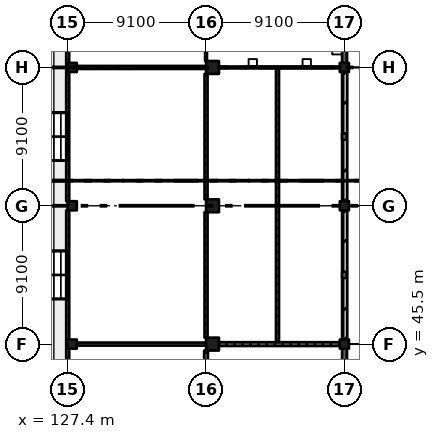
"""IFC4 building model, lengths in metres.
Left out: names, types, materials, properties, quantities, classifications, styles, units other than length and angle.
Written with IfcOpenShell. Run it as: python <this file> out.ifc"""

import sys

from ifc_helpers import new_model, si_unit, direction, frame, frame_2d, origin, origin_2d, place, context, subcontext, project, spatial, rectangle, extrude, element, fill, save


model = new_model("IFC4")
c1 = context("Model", 3, precision=1e-05, world=origin(), true_north=direction((0.0, 1.0)))
c2 = subcontext(c1, "Body", "Model", "MODEL_VIEW")
j1 = project(units=[si_unit("LENGTHUNIT", "METRE"), si_unit("PLANEANGLEUNIT", "RADIAN")], contexts=[c1])
p1 = place(None, origin())
s1 = spatial("IfcSite", under=j1, at=p1, CompositionType="ELEMENT")
p2 = place(p1, origin())
s2 = spatial("IfcBuilding", under=s1, at=p2, CompositionType="ELEMENT")
p3 = place(p2, origin())
s3 = spatial("IfcBuildingStorey", under=s2, at=p3, CompositionType="ELEMENT", Elevation=0.0)
for number, where, z_axis, x_axis in (
    (1, (127.7, 45.5, -0.4), (0.0, 0.0, 1.0), (1.0, 0.0, 0.0)),
    (2, (127.7, 54.6, -0.4), (0.0, 0.0, 1.0), (1.0, 0.0, 0.0)),
    (3, (127.7, 63.7, -0.4), (0.0, 0.0, 1.0), (1.0, 0.0, 0.0)),
):
    element("IfcColumn", number, at=place(p3, frame(where, z_axis=z_axis, x_axis=x_axis)), inside=s3, PredefinedType="COLUMN", context=c2, shape_type="SweptSolid", body=[
        extrude(rectangle(XDim=0.6, YDim=0.6, at=origin_2d()), origin(), (0.0, 0.0, 1.0), 6.77),
    ])
for number, where, z_axis, x_axis in (
    (4, (136.925, 45.5, -0.4), (0.0, 0.0, 1.0), (1.0, 0.0, 0.0)),
    (5, (136.925, 54.6, -0.4), (0.0, 0.0, 1.0), (1.0, 0.0, 0.0)),
    (6, (136.925, 63.7, -0.4), (0.0, 0.0, 1.0), (1.0, 0.0, 0.0)),
):
    element("IfcColumn", number, at=place(p3, frame(where, z_axis=z_axis, x_axis=x_axis)), inside=s3, PredefinedType="COLUMN", context=c2, shape_type="SweptSolid", body=[
        extrude(rectangle(XDim=0.85, YDim=0.85, at=origin_2d()), origin(), (0.0, 0.0, 1.0), 6.77),
    ])
for number, where, z_axis, x_axis in (
    (7, (145.6, 45.5, -0.4), (0.0, 0.0, 1.0), (1.0, 0.0, 0.0)),
    (8, (145.6, 54.6, -0.4), (0.0, 0.0, 1.0), (1.0, 0.0, 0.0)),
    (9, (145.6, 63.7, -0.4), (0.0, 0.0, 1.0), (1.0, 0.0, 0.0)),
):
    element("IfcColumn", number, at=place(p3, frame(where, z_axis=z_axis, x_axis=x_axis)), inside=s3, PredefinedType="COLUMN", context=c2, shape_type="SweptSolid", body=[
        extrude(rectangle(XDim=0.6, YDim=0.6, at=origin_2d()), origin(), (0.0, 0.0, 1.0), 6.77),
    ])
p4 = place(p3, frame((145.6, 36.725, 0.0), z_axis=(0.0, 0.0, 1.0), x_axis=(0.0, 1.0, 0.0)))
e10 = element("IfcWall", 10, at=p4, inside=s3, PredefinedType="SOLIDWALL", context=c2, shape_type="SweptSolid", body=[
    extrude(rectangle(XDim=8.475, YDim=0.3, at=frame_2d((4.237, 0.0))), origin(), (0.0, 0.0, 1.0), 5.27),
])
p5 = place(p3, frame((145.6, 45.8, 0.0), z_axis=(0.0, 0.0, 1.0), x_axis=(0.0, 1.0, 0.0)))
e11 = element("IfcWall", 11, at=p5, inside=s3, PredefinedType="SOLIDWALL", context=c2, shape_type="SweptSolid", body=[
    extrude(rectangle(XDim=8.5, YDim=0.3, at=frame_2d((4.25, 0.0))), origin(), (0.0, 0.0, 1.0), 3.75),
])
p6 = place(p5, frame((0.435, 0.0, 0.0)))
e12 = element("IfcOpeningElement", 12, at=p6, cuts=e11, PredefinedType="OPENING", context=c2, shape_type="SweptSolid", body=[
    extrude(rectangle(XDim=3.6, YDim=2.7, at=frame_2d((1.8, 1.35))), frame((0.0, 0.16, 0.0), z_axis=(0.0, -1.0, 0.0), x_axis=(1.0, 0.0, 0.0)), (0.0, 0.0, 1.0), 0.32),
])
p7 = place(p5, frame((4.465, 0.0, 0.0)))
e13 = element("IfcOpeningElement", 13, at=p7, cuts=e11, PredefinedType="OPENING", context=c2, shape_type="SweptSolid", body=[
    extrude(rectangle(XDim=3.6, YDim=2.7, at=frame_2d((1.8, 1.35))), frame((0.0, 0.16, 0.0), z_axis=(0.0, -1.0, 0.0), x_axis=(1.0, 0.0, 0.0)), (0.0, 0.0, 1.0), 0.32),
])
p8 = place(p3, frame((145.6, 49.835, 3.75), z_axis=(0.0, 0.0, 1.0), x_axis=(0.0, 1.0, 0.0)))
e14 = element("IfcWall", 14, at=p8, inside=s3, PredefinedType="SOLIDWALL", context=c2, shape_type="SweptSolid", body=[
    extrude(rectangle(XDim=0.43, YDim=0.3, at=frame_2d((0.215, 0.0))), origin(), (0.0, 0.0, 1.0), 1.52),
])
p9 = place(p3, frame((145.6, 54.9, 0.0), z_axis=(0.0, 0.0, 1.0), x_axis=(0.0, 1.0, 0.0)))
e15 = element("IfcWall", 15, at=p9, inside=s3, PredefinedType="SOLIDWALL", context=c2, shape_type="SweptSolid", body=[
    extrude(rectangle(XDim=8.5, YDim=0.3, at=frame_2d((4.25, 0.0))), origin(), (0.0, 0.0, 1.0), 3.75),
])
p10 = place(p9, frame((0.435, 0.0, 0.0)))
e16 = element("IfcOpeningElement", 16, at=p10, cuts=e15, PredefinedType="OPENING", context=c2, shape_type="SweptSolid", body=[
    extrude(rectangle(XDim=3.6, YDim=2.7, at=frame_2d((1.8, 1.35))), frame((0.0, 0.16, 0.0), z_axis=(0.0, -1.0, 0.0), x_axis=(1.0, 0.0, 0.0)), (0.0, 0.0, 1.0), 0.32),
])
p11 = place(p9, frame((4.465, 0.0, 0.0)))
e17 = element("IfcOpeningElement", 17, at=p11, cuts=e15, PredefinedType="OPENING", context=c2, shape_type="SweptSolid", body=[
    extrude(rectangle(XDim=3.6, YDim=2.7, at=frame_2d((1.8, 1.35))), frame((0.0, 0.16, 0.0), z_axis=(0.0, -1.0, 0.0), x_axis=(1.0, 0.0, 0.0)), (0.0, 0.0, 1.0), 0.32),
])
p12 = place(p3, frame((145.6, 58.935, 3.75), z_axis=(0.0, 0.0, 1.0), x_axis=(0.0, 1.0, 0.0)))
e18 = element("IfcWall", 18, at=p12, inside=s3, PredefinedType="SOLIDWALL", context=c2, shape_type="SweptSolid", body=[
    extrude(rectangle(XDim=0.43, YDim=0.3, at=frame_2d((0.215, 0.0))), origin(), (0.0, 0.0, 1.0), 1.52),
])
p13 = place(p3, frame((145.6, 64.0, 0.0), z_axis=(0.0, 0.0, 1.0), x_axis=(0.0, 1.0, 0.0)))
e19 = element("IfcWall", 19, at=p13, inside=s3, PredefinedType="SOLIDWALL", context=c2, shape_type="SweptSolid", body=[
    extrude(rectangle(XDim=8.475, YDim=0.3, at=frame_2d((4.238, 0.0))), origin(), (0.0, 0.0, 1.0), 5.27),
])
p14 = place(p3, frame((127.4, 41.05, 0.0), z_axis=(0.0, 0.0, 1.0), x_axis=(0.0, 1.0, 0.0)))
e20 = element("IfcWall", 20, at=p14, inside=s3, PredefinedType="PARTITIONING", context=c2, shape_type="SweptSolid", body=[
    extrude(rectangle(XDim=4.45, YDim=0.2, at=frame_2d((2.225, 0.0))), origin(), (0.0, 0.0, 1.0), 5.02),
])
for number, where, z_axis, x_axis in (
    (21, (127.4, 45.5, 0.0), (0.0, 0.0, 1.0), (0.0, 1.0, 0.0)),
    (22, (127.4, 54.9, 0.0), (0.0, 0.0, 1.0), (0.0, 1.0, 0.0)),
):
    element("IfcWall", number, at=place(p3, frame(where, z_axis=z_axis, x_axis=x_axis)), inside=s3, PredefinedType="PARTITIONING", context=c2, shape_type="SweptSolid", body=[
        extrude(rectangle(XDim=8.8, YDim=0.2, at=frame_2d((4.4, 0.0))), origin(), (0.0, 0.0, 1.0), 5.02),
    ])
p15 = place(p3, frame((127.4, 63.7, 0.0), z_axis=(0.0, 0.0, 1.0), x_axis=(0.0, 1.0, 0.0)))
e23 = element("IfcWall", 23, at=p15, inside=s3, PredefinedType="PARTITIONING", context=c2, shape_type="SweptSolid", body=[
    extrude(rectangle(XDim=4.45, YDim=0.2, at=frame_2d((2.225, 0.0))), origin(), (0.0, 0.0, 1.0), 5.02),
])
p16 = place(p3, frame((136.5, 45.075, 0.0), z_axis=(0.0, 0.0, 1.0), x_axis=(0.0, -1.0, 0.0)))
e24 = element("IfcWall", 24, at=p16, inside=s3, PredefinedType="SOLIDWALL", context=c2, shape_type="SweptSolid", body=[
    extrude(rectangle(XDim=4.0, YDim=0.25, at=frame_2d((2.0, 0.0))), origin(), (0.0, 0.0, 1.0), 5.32),
])
p17 = place(p16, frame((1.55, 0.0, 0.0)))
e25 = element("IfcOpeningElement", 25, at=p17, cuts=e24, PredefinedType="OPENING", context=c2, shape_type="SweptSolid", body=[
    extrude(rectangle(XDim=0.8, YDim=2.1, at=frame_2d((0.4, 1.05))), frame((0.0, 0.135, 0.0), z_axis=(0.0, -1.0, 0.0), x_axis=(1.0, 0.0, 0.0)), (0.0, 0.0, 1.0), 0.27),
])
p18 = place(p3, frame((136.5, 45.5, 0.0), z_axis=(0.0, 0.0, 1.0), x_axis=(-1.0, 0.0, 0.0)))
e26 = element("IfcWall", 26, at=p18, inside=s3, PredefinedType="PARTITIONING", context=c2, shape_type="SweptSolid", body=[
    extrude(rectangle(XDim=8.5, YDim=0.2, at=frame_2d((4.25, 0.0))), origin(), (0.0, 0.0, 1.0), 5.27),
])
p19 = place(p18, frame((0.65, 0.0, 0.0)))
e27 = element("IfcOpeningElement", 27, at=p19, cuts=e26, PredefinedType="OPENING", context=c2, shape_type="SweptSolid", body=[
    extrude(rectangle(XDim=3.0, YDim=2.4, at=frame_2d((1.5, 1.2))), frame((0.0, 0.11, 0.0), z_axis=(0.0, -1.0, 0.0), x_axis=(1.0, 0.0, 0.0)), (0.0, 0.0, 1.0), 0.22),
])
p20 = place(p18, frame((4.85, 0.0, 0.0)))
e28 = element("IfcOpeningElement", 28, at=p20, cuts=e26, PredefinedType="OPENING", context=c2, shape_type="SweptSolid", body=[
    extrude(rectangle(XDim=3.0, YDim=2.4, at=frame_2d((1.5, 1.2))), frame((0.0, 0.11, 0.0), z_axis=(0.0, -1.0, 0.0), x_axis=(1.0, 0.0, 0.0)), (0.0, 0.0, 1.0), 0.22),
])
p21 = place(p3, frame((136.5, 54.175, 0.0), z_axis=(0.0, 0.0, 1.0), x_axis=(0.0, -1.0, 0.0)))
e29 = element("IfcWall", 29, at=p21, inside=s3, PredefinedType="PARTITIONING", context=c2, shape_type="SweptSolid", body=[
    extrude(rectangle(XDim=8.25, YDim=0.2, at=frame_2d((4.125, 0.0))), origin(), (0.0, 0.0, 1.0), 5.32),
])
p22 = place(p21, frame((1.15, 0.0, 0.0)))
e30 = element("IfcOpeningElement", 30, at=p22, cuts=e29, PredefinedType="OPENING", context=c2, shape_type="SweptSolid", body=[
    extrude(rectangle(XDim=1.8, YDim=2.4, at=frame_2d((0.9, 1.2))), frame((0.0, 0.11, 0.0), z_axis=(0.0, -1.0, 0.0), x_axis=(1.0, 0.0, 0.0)), (0.0, 0.0, 1.0), 0.22),
])
p23 = place(p21, frame((5.25, 0.0, 0.0)))
e31 = element("IfcOpeningElement", 31, at=p23, cuts=e29, PredefinedType="OPENING", context=c2, shape_type="SweptSolid", body=[
    extrude(rectangle(XDim=1.8, YDim=2.4, at=frame_2d((0.9, 1.2))), frame((0.0, 0.11, 0.0), z_axis=(0.0, -1.0, 0.0), x_axis=(1.0, 0.0, 0.0)), (0.0, 0.0, 1.0), 0.22),
])
p24 = place(p21, frame((3.45, 0.0, 0.0)))
e32 = element("IfcOpeningElement", 32, at=p24, cuts=e29, PredefinedType="OPENING", context=c2, shape_type="SweptSolid", body=[
    extrude(rectangle(XDim=1.8, YDim=2.4, at=frame_2d((0.9, 1.2))), frame((0.0, 0.11, 0.0), z_axis=(0.0, -1.0, 0.0), x_axis=(1.0, 0.0, 0.0)), (0.0, 0.0, 1.0), 0.22),
])
p25 = place(p3, frame((136.5, 63.275, 0.0), z_axis=(0.0, 0.0, 1.0), x_axis=(0.0, -1.0, 0.0)))
e33 = element("IfcWall", 33, at=p25, inside=s3, PredefinedType="PARTITIONING", context=c2, shape_type="SweptSolid", body=[
    extrude(rectangle(XDim=8.25, YDim=0.2, at=frame_2d((4.125, 0.0))), origin(), (0.0, 0.0, 1.0), 5.32),
])
p26 = place(p25, frame((1.15, 0.0, 0.0)))
e34 = element("IfcOpeningElement", 34, at=p26, cuts=e33, PredefinedType="OPENING", context=c2, shape_type="SweptSolid", body=[
    extrude(rectangle(XDim=1.8, YDim=2.4, at=frame_2d((0.9, 1.2))), frame((0.0, 0.11, 0.0), z_axis=(0.0, -1.0, 0.0), x_axis=(1.0, 0.0, 0.0)), (0.0, 0.0, 1.0), 0.22),
])
p27 = place(p25, frame((5.25, 0.0, 0.0)))
e35 = element("IfcOpeningElement", 35, at=p27, cuts=e33, PredefinedType="OPENING", context=c2, shape_type="SweptSolid", body=[
    extrude(rectangle(XDim=1.8, YDim=2.4, at=frame_2d((0.9, 1.2))), frame((0.0, 0.11, 0.0), z_axis=(0.0, -1.0, 0.0), x_axis=(1.0, 0.0, 0.0)), (0.0, 0.0, 1.0), 0.22),
])
p28 = place(p3, frame((136.5, 63.7, 0.0), z_axis=(0.0, 0.0, 1.0), x_axis=(-1.0, 0.0, 0.0)))
e36 = element("IfcWall", 36, at=p28, inside=s3, PredefinedType="PARTITIONING", context=c2, shape_type="SweptSolid", body=[
    extrude(rectangle(XDim=8.5, YDim=0.2, at=frame_2d((4.25, 0.0))), origin(), (0.0, 0.0, 1.0), 5.27),
])
p29 = place(p28, frame((0.65, 0.0, 0.0)))
e37 = element("IfcOpeningElement", 37, at=p29, cuts=e36, PredefinedType="OPENING", context=c2, shape_type="SweptSolid", body=[
    extrude(rectangle(XDim=3.0, YDim=2.4, at=frame_2d((1.5, 1.2))), frame((0.0, 0.11, 0.0), z_axis=(0.0, -1.0, 0.0), x_axis=(1.0, 0.0, 0.0)), (0.0, 0.0, 1.0), 0.22),
])
p30 = place(p28, frame((4.85, 0.0, 0.0)))
e38 = element("IfcOpeningElement", 38, at=p30, cuts=e36, PredefinedType="OPENING", context=c2, shape_type="SweptSolid", body=[
    extrude(rectangle(XDim=3.0, YDim=2.4, at=frame_2d((1.5, 1.2))), frame((0.0, 0.11, 0.0), z_axis=(0.0, -1.0, 0.0), x_axis=(1.0, 0.0, 0.0)), (0.0, 0.0, 1.0), 0.22),
])
p31 = place(p3, frame((136.5, 68.15, 0.0), z_axis=(0.0, 0.0, 1.0), x_axis=(0.0, -1.0, 0.0)))
e39 = element("IfcWall", 39, at=p31, inside=s3, PredefinedType="PARTITIONING", context=c2, shape_type="SweptSolid", body=[
    extrude(rectangle(XDim=4.025, YDim=0.125, at=frame_2d((2.012, 0.0))), origin(), (0.0, 0.0, 1.0), 5.32),
])
p32 = place(p31, frame((1.55, 0.0, 0.0)))
e40 = element("IfcOpeningElement", 40, at=p32, cuts=e39, PredefinedType="OPENING", context=c2, shape_type="SweptSolid", body=[
    extrude(rectangle(XDim=0.9, YDim=2.1, at=frame_2d((0.45, 1.05))), frame((0.0, 0.073, 0.0), z_axis=(0.0, -1.0, 0.0), x_axis=(1.0, 0.0, 0.0)), (0.0, 0.0, 1.0), 0.145),
])
p33 = place(p3, frame((137.35, 63.7, 0.0), z_axis=(0.0, 0.0, 1.0), x_axis=(1.0, 0.0, 0.0)))
e41 = element("IfcWall", 41, at=p33, inside=s3, PredefinedType="PARTITIONING", context=c2, shape_type="SweptSolid", body=[
    extrude(rectangle(XDim=7.95, YDim=0.125, at=frame_2d((3.975, 0.0))), origin(), (0.0, 0.0, 1.0), 5.32),
])
p34 = place(p3, frame((137.35, 45.5, 0.0), z_axis=(0.0, 0.0, 1.0), x_axis=(1.0, 0.0, 0.0)))
e42 = element("IfcWall", 42, at=p34, inside=s3, PredefinedType="SOLIDWALL", context=c2, shape_type="SweptSolid", body=[
    extrude(rectangle(XDim=7.95, YDim=0.25, at=frame_2d((3.975, 0.0))), origin(), (0.0, 0.0, 1.0), 5.32),
])
p35 = place(p3, frame((141.2, 63.637, 0.0), z_axis=(0.0, 0.0, 1.0), x_axis=(0.0, -1.0, 0.0)))
e43 = element("IfcWall", 43, at=p35, inside=s3, PredefinedType="PARTITIONING", context=c2, shape_type="SweptSolid", body=[
    extrude(rectangle(XDim=18.012, YDim=0.2, at=frame_2d((9.006, 0.0))), origin(), (0.0, 0.0, 1.0), 6.02),
])
p36 = place(p35, frame((0.65, 0.0, 0.0)))
e44 = element("IfcOpeningElement", 44, at=p36, cuts=e43, PredefinedType="OPENING", context=c2, shape_type="SweptSolid", body=[
    extrude(rectangle(XDim=1.8, YDim=2.4, at=frame_2d((0.9, 1.2))), frame((0.0, 0.11, 0.0), z_axis=(0.0, -1.0, 0.0), x_axis=(1.0, 0.0, 0.0)), (0.0, 0.0, 1.0), 0.22),
])
p37 = place(p35, frame((3.65, 0.0, 0.0)))
e45 = element("IfcOpeningElement", 45, at=p37, cuts=e43, PredefinedType="OPENING", context=c2, shape_type="SweptSolid", body=[
    extrude(rectangle(XDim=1.8, YDim=2.4, at=frame_2d((0.9, 1.2))), frame((0.0, 0.11, 0.0), z_axis=(0.0, -1.0, 0.0), x_axis=(1.0, 0.0, 0.0)), (0.0, 0.0, 1.0), 0.22),
])
p38 = place(p35, frame((6.65, 0.0, 0.0)))
e46 = element("IfcOpeningElement", 46, at=p38, cuts=e43, PredefinedType="OPENING", context=c2, shape_type="SweptSolid", body=[
    extrude(rectangle(XDim=1.8, YDim=2.4, at=frame_2d((0.9, 1.2))), frame((0.0, 0.11, 0.0), z_axis=(0.0, -1.0, 0.0), x_axis=(1.0, 0.0, 0.0)), (0.0, 0.0, 1.0), 0.22),
])
p39 = place(p35, frame((9.65, 0.0, 0.0)))
e47 = element("IfcOpeningElement", 47, at=p39, cuts=e43, PredefinedType="OPENING", context=c2, shape_type="SweptSolid", body=[
    extrude(rectangle(XDim=1.8, YDim=2.4, at=frame_2d((0.9, 1.2))), frame((0.0, 0.11, 0.0), z_axis=(0.0, -1.0, 0.0), x_axis=(1.0, 0.0, 0.0)), (0.0, 0.0, 1.0), 0.22),
])
p40 = place(p35, frame((12.65, 0.0, 0.0)))
e48 = element("IfcOpeningElement", 48, at=p40, cuts=e43, PredefinedType="OPENING", context=c2, shape_type="SweptSolid", body=[
    extrude(rectangle(XDim=1.8, YDim=2.4, at=frame_2d((0.9, 1.2))), frame((0.0, 0.11, 0.0), z_axis=(0.0, -1.0, 0.0), x_axis=(1.0, 0.0, 0.0)), (0.0, 0.0, 1.0), 0.22),
])
p41 = place(p35, frame((15.65, 0.0, 0.0)))
e49 = element("IfcOpeningElement", 49, at=p41, cuts=e43, PredefinedType="OPENING", context=c2, shape_type="SweptSolid", body=[
    extrude(rectangle(XDim=1.8, YDim=2.4, at=frame_2d((0.9, 1.2))), frame((0.0, 0.11, 0.0), z_axis=(0.0, -1.0, 0.0), x_axis=(1.0, 0.0, 0.0)), (0.0, 0.0, 1.0), 0.22),
])
p42 = place(p6, frame((3.6, 0.0, 0.0), z_axis=(0.0, 0.0, 1.0), x_axis=(-1.0, 0.0, 0.0)))
e50 = element("IfcDoor", 50, at=p42, inside=s3, OperationType="DOUBLE_DOOR_SINGLE_SWING", PredefinedType="DOOR", context=c2, shape_type="SweptSolid", body=[
    extrude(rectangle(XDim=3.6, YDim=2.7, at=frame_2d((1.8, 1.35))), frame((0.0, 0.025, 0.0), z_axis=(0.0, -1.0, 0.0), x_axis=(1.0, 0.0, 0.0)), (0.0, 0.0, 1.0), 0.05),
])
fill(e12, e50)
p43 = place(p7, frame((3.6, 0.0, 0.0), z_axis=(0.0, 0.0, 1.0), x_axis=(-1.0, 0.0, 0.0)))
e51 = element("IfcDoor", 51, at=p43, inside=s3, OperationType="DOUBLE_DOOR_SINGLE_SWING", PredefinedType="DOOR", context=c2, shape_type="SweptSolid", body=[
    extrude(rectangle(XDim=3.6, YDim=2.7, at=frame_2d((1.8, 1.35))), frame((0.0, 0.025, 0.0), z_axis=(0.0, -1.0, 0.0), x_axis=(1.0, 0.0, 0.0)), (0.0, 0.0, 1.0), 0.05),
])
fill(e13, e51)
p44 = place(p10, frame((3.6, 0.0, 0.0), z_axis=(0.0, 0.0, 1.0), x_axis=(-1.0, 0.0, 0.0)))
e52 = element("IfcDoor", 52, at=p44, inside=s3, OperationType="DOUBLE_DOOR_SINGLE_SWING", PredefinedType="DOOR", context=c2, shape_type="SweptSolid", body=[
    extrude(rectangle(XDim=3.6, YDim=2.7, at=frame_2d((1.8, 1.35))), frame((0.0, 0.025, 0.0), z_axis=(0.0, -1.0, 0.0), x_axis=(1.0, 0.0, 0.0)), (0.0, 0.0, 1.0), 0.05),
])
fill(e16, e52)
p45 = place(p11, frame((3.6, 0.0, 0.0), z_axis=(0.0, 0.0, 1.0), x_axis=(-1.0, 0.0, 0.0)))
e53 = element("IfcDoor", 53, at=p45, inside=s3, OperationType="DOUBLE_DOOR_SINGLE_SWING", PredefinedType="DOOR", context=c2, shape_type="SweptSolid", body=[
    extrude(rectangle(XDim=3.6, YDim=2.7, at=frame_2d((1.8, 1.35))), frame((0.0, 0.025, 0.0), z_axis=(0.0, -1.0, 0.0), x_axis=(1.0, 0.0, 0.0)), (0.0, 0.0, 1.0), 0.05),
])
fill(e17, e53)
p46 = place(p22, origin())
e54 = element("IfcDoor", 54, at=p46, inside=s3, OperationType="DOUBLE_DOOR_SINGLE_SWING", PredefinedType="DOOR", context=c2, shape_type="SweptSolid", body=[
    extrude(rectangle(XDim=1.8, YDim=2.4, at=frame_2d((0.9, 1.2))), frame((0.0, 0.025, 0.0), z_axis=(0.0, -1.0, 0.0), x_axis=(1.0, 0.0, 0.0)), (0.0, 0.0, 1.0), 0.05),
])
fill(e30, e54)
p47 = place(p23, origin())
e55 = element("IfcDoor", 55, at=p47, inside=s3, OperationType="DOUBLE_DOOR_SINGLE_SWING", PredefinedType="DOOR", context=c2, shape_type="SweptSolid", body=[
    extrude(rectangle(XDim=1.8, YDim=2.4, at=frame_2d((0.9, 1.2))), frame((0.0, 0.025, 0.0), z_axis=(0.0, -1.0, 0.0), x_axis=(1.0, 0.0, 0.0)), (0.0, 0.0, 1.0), 0.05),
])
fill(e31, e55)
p48 = place(p24, origin())
e56 = element("IfcDoor", 56, at=p48, inside=s3, OperationType="DOUBLE_DOOR_SINGLE_SWING", PredefinedType="DOOR", context=c2, shape_type="SweptSolid", body=[
    extrude(rectangle(XDim=1.8, YDim=2.4, at=frame_2d((0.9, 1.2))), frame((0.0, 0.025, 0.0), z_axis=(0.0, -1.0, 0.0), x_axis=(1.0, 0.0, 0.0)), (0.0, 0.0, 1.0), 0.05),
])
fill(e32, e56)
p49 = place(p26, origin())
e57 = element("IfcDoor", 57, at=p49, inside=s3, OperationType="DOUBLE_DOOR_SINGLE_SWING", PredefinedType="DOOR", context=c2, shape_type="SweptSolid", body=[
    extrude(rectangle(XDim=1.8, YDim=2.4, at=frame_2d((0.9, 1.2))), frame((0.0, 0.025, 0.0), z_axis=(0.0, -1.0, 0.0), x_axis=(1.0, 0.0, 0.0)), (0.0, 0.0, 1.0), 0.05),
])
fill(e34, e57)
p50 = place(p27, origin())
e58 = element("IfcDoor", 58, at=p50, inside=s3, OperationType="DOUBLE_DOOR_SINGLE_SWING", PredefinedType="DOOR", context=c2, shape_type="SweptSolid", body=[
    extrude(rectangle(XDim=1.8, YDim=2.4, at=frame_2d((0.9, 1.2))), frame((0.0, 0.025, 0.0), z_axis=(0.0, -1.0, 0.0), x_axis=(1.0, 0.0, 0.0)), (0.0, 0.0, 1.0), 0.05),
])
fill(e35, e58)
p51 = place(p29, origin())
e59 = element("IfcDoor", 59, at=p51, inside=s3, OperationType="DOUBLE_DOOR_SINGLE_SWING", PredefinedType="DOOR", context=c2, shape_type="SweptSolid", body=[
    extrude(rectangle(XDim=3.0, YDim=2.4, at=frame_2d((1.5, 1.2))), frame((0.0, 0.025, 0.0), z_axis=(0.0, -1.0, 0.0), x_axis=(1.0, 0.0, 0.0)), (0.0, 0.0, 1.0), 0.05),
])
fill(e37, e59)
p52 = place(p30, origin())
e60 = element("IfcDoor", 60, at=p52, inside=s3, OperationType="DOUBLE_DOOR_SINGLE_SWING", PredefinedType="DOOR", context=c2, shape_type="SweptSolid", body=[
    extrude(rectangle(XDim=3.0, YDim=2.4, at=frame_2d((1.5, 1.2))), frame((0.0, 0.025, 0.0), z_axis=(0.0, -1.0, 0.0), x_axis=(1.0, 0.0, 0.0)), (0.0, 0.0, 1.0), 0.05),
])
fill(e38, e60)
p53 = place(p19, origin())
e61 = element("IfcDoor", 61, at=p53, inside=s3, OperationType="DOUBLE_DOOR_SINGLE_SWING", PredefinedType="DOOR", context=c2, shape_type="SweptSolid", body=[
    extrude(rectangle(XDim=3.0, YDim=2.4, at=frame_2d((1.5, 1.2))), frame((0.0, 0.025, 0.0), z_axis=(0.0, -1.0, 0.0), x_axis=(1.0, 0.0, 0.0)), (0.0, 0.0, 1.0), 0.05),
])
fill(e27, e61)
p54 = place(p20, origin())
e62 = element("IfcDoor", 62, at=p54, inside=s3, OperationType="DOUBLE_DOOR_SINGLE_SWING", PredefinedType="DOOR", context=c2, shape_type="SweptSolid", body=[
    extrude(rectangle(XDim=3.0, YDim=2.4, at=frame_2d((1.5, 1.2))), frame((0.0, 0.025, 0.0), z_axis=(0.0, -1.0, 0.0), x_axis=(1.0, 0.0, 0.0)), (0.0, 0.0, 1.0), 0.05),
])
fill(e28, e62)
p55 = place(p36, origin())
e63 = element("IfcDoor", 63, at=p55, inside=s3, OperationType="DOUBLE_DOOR_SINGLE_SWING", PredefinedType="DOOR", context=c2, shape_type="SweptSolid", body=[
    extrude(rectangle(XDim=1.8, YDim=2.4, at=frame_2d((0.9, 1.2))), frame((0.0, 0.025, 0.0), z_axis=(0.0, -1.0, 0.0), x_axis=(1.0, 0.0, 0.0)), (0.0, 0.0, 1.0), 0.05),
])
fill(e44, e63)
p56 = place(p37, origin())
e64 = element("IfcDoor", 64, at=p56, inside=s3, OperationType="DOUBLE_DOOR_SINGLE_SWING", PredefinedType="DOOR", context=c2, shape_type="SweptSolid", body=[
    extrude(rectangle(XDim=1.8, YDim=2.4, at=frame_2d((0.9, 1.2))), frame((0.0, 0.025, 0.0), z_axis=(0.0, -1.0, 0.0), x_axis=(1.0, 0.0, 0.0)), (0.0, 0.0, 1.0), 0.05),
])
fill(e45, e64)
p57 = place(p38, origin())
e65 = element("IfcDoor", 65, at=p57, inside=s3, OperationType="DOUBLE_DOOR_SINGLE_SWING", PredefinedType="DOOR", context=c2, shape_type="SweptSolid", body=[
    extrude(rectangle(XDim=1.8, YDim=2.4, at=frame_2d((0.9, 1.2))), frame((0.0, 0.025, 0.0), z_axis=(0.0, -1.0, 0.0), x_axis=(1.0, 0.0, 0.0)), (0.0, 0.0, 1.0), 0.05),
])
fill(e46, e65)
p58 = place(p39, origin())
e66 = element("IfcDoor", 66, at=p58, inside=s3, OperationType="DOUBLE_DOOR_SINGLE_SWING", PredefinedType="DOOR", context=c2, shape_type="SweptSolid", body=[
    extrude(rectangle(XDim=1.8, YDim=2.4, at=frame_2d((0.9, 1.2))), frame((0.0, 0.025, 0.0), z_axis=(0.0, -1.0, 0.0), x_axis=(1.0, 0.0, 0.0)), (0.0, 0.0, 1.0), 0.05),
])
fill(e47, e66)
p59 = place(p40, origin())
e67 = element("IfcDoor", 67, at=p59, inside=s3, OperationType="DOUBLE_DOOR_SINGLE_SWING", PredefinedType="DOOR", context=c2, shape_type="SweptSolid", body=[
    extrude(rectangle(XDim=1.8, YDim=2.4, at=frame_2d((0.9, 1.2))), frame((0.0, 0.025, 0.0), z_axis=(0.0, -1.0, 0.0), x_axis=(1.0, 0.0, 0.0)), (0.0, 0.0, 1.0), 0.05),
])
fill(e48, e67)
p60 = place(p41, origin())
e68 = element("IfcDoor", 68, at=p60, inside=s3, OperationType="DOUBLE_DOOR_SINGLE_SWING", PredefinedType="DOOR", context=c2, shape_type="SweptSolid", body=[
    extrude(rectangle(XDim=1.8, YDim=2.4, at=frame_2d((0.9, 1.2))), frame((0.0, 0.025, 0.0), z_axis=(0.0, -1.0, 0.0), x_axis=(1.0, 0.0, 0.0)), (0.0, 0.0, 1.0), 0.05),
])
fill(e49, e68)
save(model, sys.argv[1])
